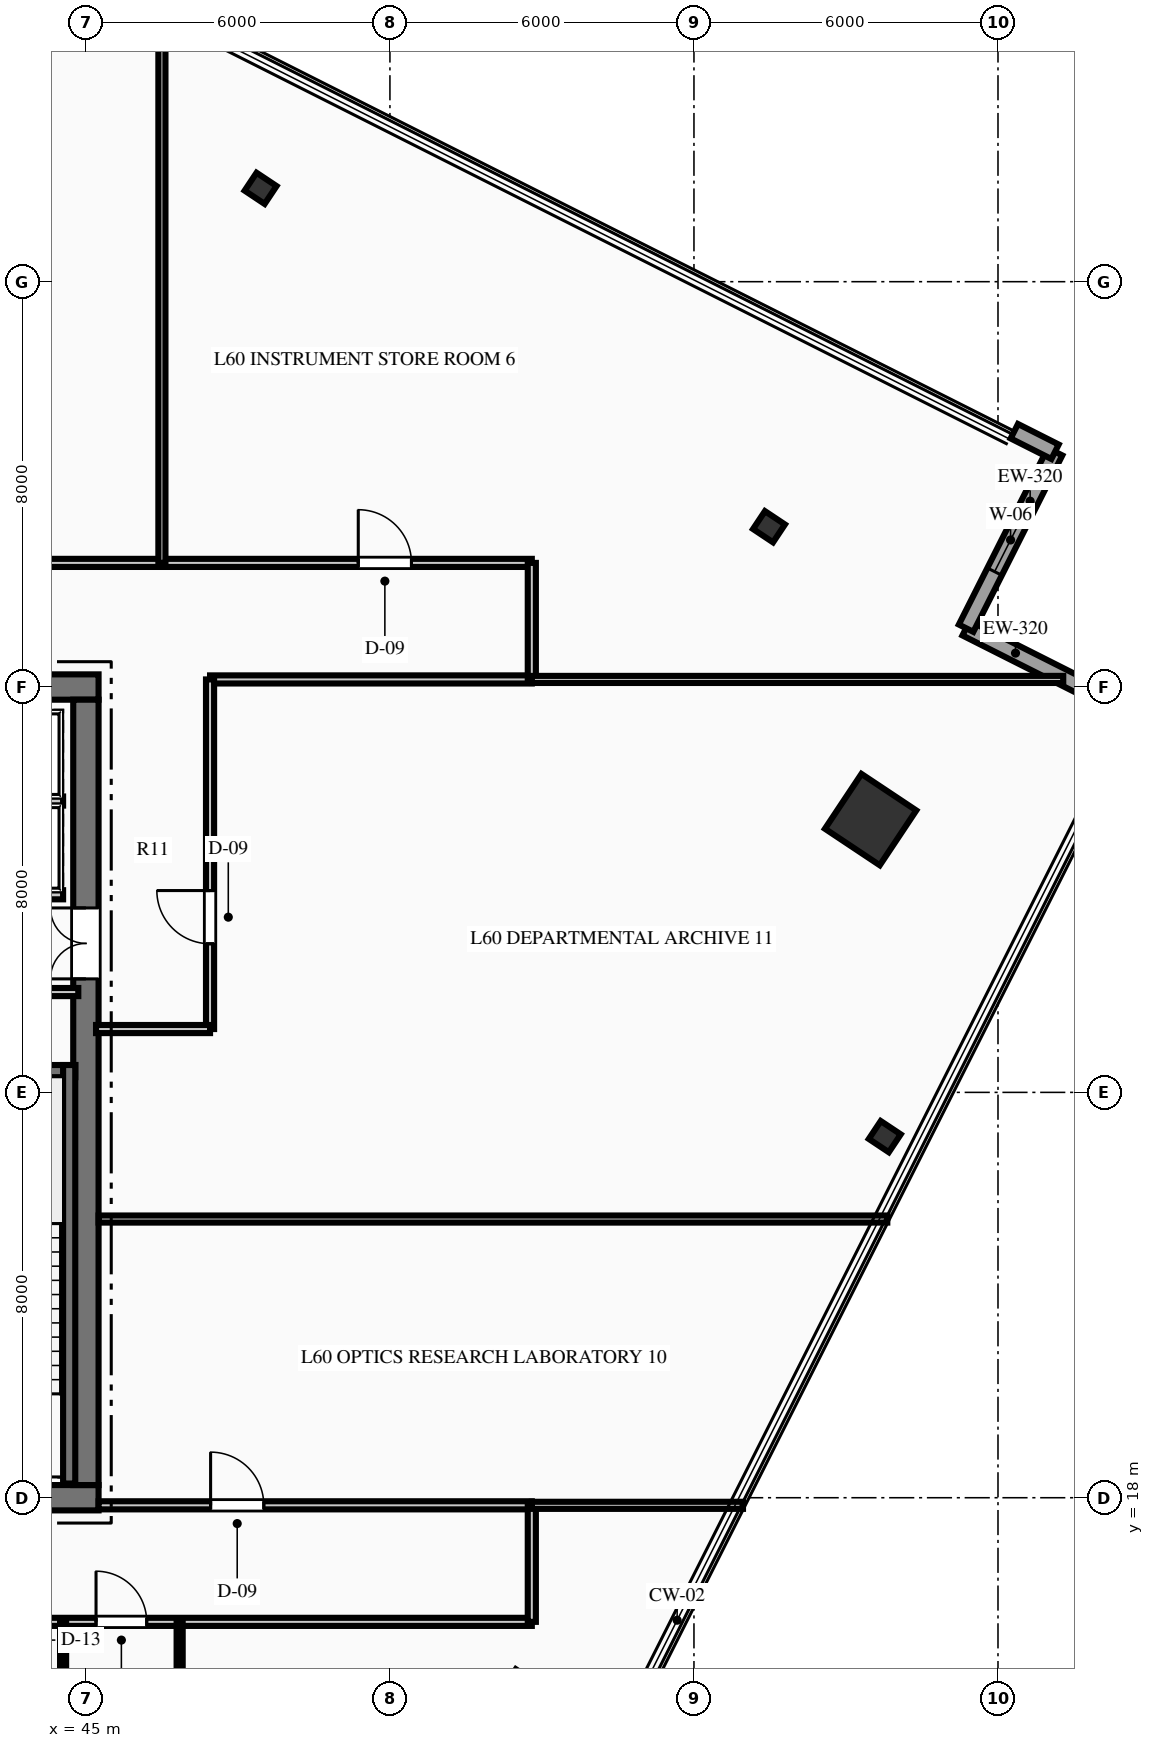
"""IFC4 building model, lengths in metres.
Left out: names, types, materials, properties, quantities, classifications, styles, units other than length and angle.
Written with IfcOpenShell. Run it as: python <this file> out.ifc"""

import sys

from ifc_helpers import new_model, si_unit, direction, frame, frame_2d, origin, origin_2d, place, context, subcontext, project, spatial, rectangle, hollow_rectangle, i_section, extrude, element, fill, save


model = new_model("IFC4")
c1 = context("Model", 3, precision=1e-05, world=origin(), true_north=direction((0.0, 1.0)))
c2 = subcontext(c1, "Body", "Model", "MODEL_VIEW")
j1 = project(units=[si_unit("LENGTHUNIT", "METRE"), si_unit("PLANEANGLEUNIT", "RADIAN")], contexts=[c1])
p1 = place(None, origin())
s1 = spatial("IfcSite", under=j1, at=p1, CompositionType="ELEMENT")
p2 = place(p1, origin())
s2 = spatial("IfcBuilding", under=s1, at=p2, CompositionType="ELEMENT")
p3 = place(p2, frame((0.0, 0.0, 239.7)))
s3 = spatial("IfcBuildingStorey", under=s2, at=p3, CompositionType="ELEMENT", Elevation=239.7)
p4 = place(p3, frame((26.75, 18.0, 0.0), z_axis=(0.0, 0.0, 1.0), x_axis=(1.0, 0.0, 0.0)))
e1 = element("IfcWall", 1, at=p4, inside=s3, PredefinedType="SHEAR", context=c2, shape_type="SweptSolid", body=[
    extrude(rectangle(XDim=18.5, YDim=0.5, at=frame_2d((9.25, 0.0))), origin(), (0.0, 0.0, 1.0), 4.5),
])
p5 = place(p4, frame((7.35, 0.0, 0.0)))
e2 = element("IfcOpeningElement", 2, at=p5, cuts=e1, PredefinedType="OPENING", context=c2, shape_type="SweptSolid", body=[
    extrude(rectangle(XDim=1.1, YDim=2.15, at=frame_2d((0.55, 1.075))), frame((0.0, 0.26, 0.0), z_axis=(0.0, -1.0, 0.0), x_axis=(1.0, 0.0, 0.0)), (0.0, 0.0, 1.0), 0.52),
])
p6 = place(p4, frame((10.05, 0.0, 0.0)))
e3 = element("IfcOpeningElement", 3, at=p6, cuts=e1, PredefinedType="OPENING", context=c2, shape_type="SweptSolid", body=[
    extrude(rectangle(XDim=1.1, YDim=2.15, at=frame_2d((0.55, 1.075))), frame((0.0, 0.26, 0.0), z_axis=(0.0, -1.0, 0.0), x_axis=(1.0, 0.0, 0.0)), (0.0, 0.0, 1.0), 0.52),
])
p7 = place(p3, frame((26.75, 34.0, 0.0), z_axis=(0.0, 0.0, 1.0), x_axis=(1.0, 0.0, 0.0)))
e4 = element("IfcWall", 4, at=p7, inside=s3, PredefinedType="SHEAR", context=c2, shape_type="SweptSolid", body=[
    extrude(rectangle(XDim=18.5, YDim=0.5, at=frame_2d((9.25, 0.0))), origin(), (0.0, 0.0, 1.0), 4.5),
])
p8 = place(p7, frame((13.935, 0.0, 0.0)))
e5 = element("IfcOpeningElement", 5, at=p8, cuts=e4, PredefinedType="OPENING", context=c2, shape_type="SweptSolid", body=[
    extrude(rectangle(XDim=1.1, YDim=2.15, at=frame_2d((0.55, 1.075))), frame((0.0, 0.26, 0.0), z_axis=(0.0, -1.0, 0.0), x_axis=(1.0, 0.0, 0.0)), (0.0, 0.0, 1.0), 0.52),
])
p9 = place(p7, frame((16.185, 0.0, 0.0)))
e6 = element("IfcOpeningElement", 6, at=p9, cuts=e4, PredefinedType="OPENING", context=c2, shape_type="SweptSolid", body=[
    extrude(rectangle(XDim=1.1, YDim=2.15, at=frame_2d((0.55, 1.075))), frame((0.0, 0.26, 0.0), z_axis=(0.0, -1.0, 0.0), x_axis=(1.0, 0.0, 0.0)), (0.0, 0.0, 1.0), 0.52),
])
p10 = place(p3, frame((45.0, 18.25, 0.0), z_axis=(0.0, 0.0, 1.0), x_axis=(0.0, 1.0, 0.0)))
e7 = element("IfcWall", 7, at=p10, inside=s3, PredefinedType="SHEAR", context=c2, shape_type="SweptSolid", body=[
    extrude(rectangle(XDim=15.5, YDim=0.5, at=frame_2d((7.75, 0.0))), origin(), (0.0, 0.0, 1.0), 4.5),
])
p11 = place(p10, frame((9.99, 0.0, 0.0)))
e8 = element("IfcOpeningElement", 8, at=p11, cuts=e7, PredefinedType="OPENING", context=c2, shape_type="SweptSolid", body=[
    extrude(rectangle(XDim=1.4, YDim=2.2, at=frame_2d((0.7, 1.1))), frame((0.0, 0.26, 0.0), z_axis=(0.0, -1.0, 0.0), x_axis=(1.0, 0.0, 0.0)), (0.0, 0.0, 1.0), 0.52),
])
p12 = place(p3, frame((40.81, 26.42, 0.0), z_axis=(0.0, 0.0, 1.0), x_axis=(1.0, 0.0, 0.0)))
e9 = element("IfcWall", 9, at=p12, inside=s3, PredefinedType="SHEAR", context=c2, shape_type="SweptSolid", body=[
    extrude(rectangle(XDim=3.98, YDim=0.24, at=frame_2d((1.99, 0.0))), origin(), (0.0, 0.0, 1.0), 4.5),
])
p13 = place(p3, frame((44.67, 18.28, 0.0), z_axis=(0.0, 0.0, 1.0), x_axis=(0.0, 1.0, 0.0)))
e10 = element("IfcWall", 10, at=p13, inside=s3, PredefinedType="SHEAR", context=c2, shape_type="SweptSolid", body=[
    extrude(rectangle(XDim=8.26, YDim=0.24, at=frame_2d((4.13, 0.0))), origin(), (0.0, 0.0, 1.0), 4.5),
])
p14 = place(p3, frame((60.486, 31.384, 0.0), z_axis=(0.0, 0.0, 1.0), x_axis=(0.554118199338, 0.832437998389, 0.0)))
e11 = element("IfcColumn", 11, at=p14, inside=s3, PredefinedType="COLUMN", context=c2, shape_type="SweptSolid", body=[
    extrude(hollow_rectangle(XDim=1.3, YDim=1.3, WallThickness=0.06, at=origin_2d()), origin(), (0.0, 0.0, 1.0), 4.5),
])
for number, where, z_axis, x_axis in (
    (12, (60.766, 25.126, 0.0), (0.0, 0.0, 1.0), (0.554, 0.832, 0.0)),
    (13, (58.481, 37.164, 0.0), (0.0, 0.0, 1.0), (0.554, 0.832, 0.0)),
    (14, (48.448, 43.842, 0.0), (0.0, 0.0, 1.0), (0.554, 0.832, 0.0)),
):
    element("IfcColumn", number, at=place(p3, frame(where, z_axis=z_axis, x_axis=x_axis)), inside=s3, PredefinedType="COLUMN", context=c2, shape_type="SweptSolid", body=[
        extrude(i_section(OverallWidth=0.424, OverallDepth=0.474, WebThickness=0.048, FlangeThickness=0.077, at=origin_2d()), origin(), (0.0, 0.0, 1.0), 4.5),
    ])
p15 = place(p3, frame((62.371, 35.161, 0.0), z_axis=(0.0, 0.0, 1.0), x_axis=(0.892982765682, -0.450090857711, 0.0)))
e15 = element("IfcWall", 15, at=p15, inside=s3, PredefinedType="STANDARD", context=c2, shape_type="SweptSolid", body=[
    extrude(rectangle(XDim=3.9, YDim=0.32, at=frame_2d((1.95, 0.0))), origin(), (0.0, 0.0, 1.0), 4.1),
])
p16 = place(p3, frame((64.126, 38.644, 0.0), z_axis=(0.0, 0.0, 1.0), x_axis=(-0.450090857711, -0.892982765682, 0.0)))
e16 = element("IfcWall", 16, at=p16, inside=s3, PredefinedType="STANDARD", context=c2, shape_type="SweptSolid", body=[
    extrude(rectangle(XDim=3.9, YDim=0.32, at=frame_2d((1.95, 0.0))), origin(), (0.0, 0.0, 1.0), 4.1),
])
p17 = place(p16, frame((1.25, 0.0, 0.85)))
e17 = element("IfcOpeningElement", 17, at=p17, cuts=e16, PredefinedType="OPENING", context=c2, shape_type="SweptSolid", body=[
    extrude(rectangle(XDim=1.4, YDim=2.0, at=frame_2d((0.7, 1.0))), frame((0.0, 0.17, 0.0), z_axis=(0.0, -1.0, 0.0), x_axis=(1.0, 0.0, 0.0)), (0.0, 0.0, 1.0), 0.34),
])
p18 = place(p3, frame((63.322, 39.049, 0.0), z_axis=(0.0, 0.0, 1.0), x_axis=(0.893012151464, -0.450032551421, 0.0)))
e18 = element("IfcWall", 18, at=p18, inside=s3, PredefinedType="STANDARD", context=c2, shape_type="SweptSolid", body=[
    extrude(rectangle(XDim=0.9, YDim=0.32, at=frame_2d((0.45, 0.0))), origin(), (0.0, 0.0, 1.0), 4.1),
])
p19 = place(p3, frame((40.8, 27.98, 0.0), z_axis=(0.0, 0.0, 1.0), x_axis=(1.0, 0.0, 0.0)))
e19 = element("IfcWall", 19, at=p19, inside=s3, PredefinedType="PARTITIONING", context=c2, shape_type="SweptSolid", body=[
    extrude(rectangle(XDim=4.05, YDim=0.16, at=frame_2d((2.025, 0.0))), origin(), (0.0, 0.0, 1.0), 4.1),
])
p20 = place(p19, frame((0.407, 0.0, 0.0)))
e20 = element("IfcOpeningElement", 20, at=p20, cuts=e19, PredefinedType="OPENING", context=c2, shape_type="SweptSolid", body=[
    extrude(rectangle(XDim=0.9, YDim=2.15, at=frame_2d((0.45, 1.075))), frame((0.0, 0.09, 0.0), z_axis=(0.0, -1.0, 0.0), x_axis=(1.0, 0.0, 0.0)), (0.0, 0.0, 1.0), 0.18),
])
p21 = place(p19, frame((2.2, 0.0, 0.0)))
e21 = element("IfcOpeningElement", 21, at=p21, cuts=e19, PredefinedType="OPENING", context=c2, shape_type="SweptSolid", body=[
    extrude(rectangle(XDim=0.9, YDim=2.15, at=frame_2d((0.45, 1.075))), frame((0.0, 0.09, 0.0), z_axis=(0.0, -1.0, 0.0), x_axis=(1.0, 0.0, 0.0)), (0.0, 0.0, 1.0), 0.18),
])
p22 = place(p3, frame((40.12, 29.9, 0.0), z_axis=(0.0, 0.0, 1.0), x_axis=(1.0, 0.0, 0.0)))
e22 = element("IfcWall", 22, at=p22, inside=s3, PredefinedType="PARTITIONING", context=c2, shape_type="SweptSolid", body=[
    extrude(rectangle(XDim=4.43, YDim=0.18, at=frame_2d((2.215, 0.0))), origin(), (0.0, 0.0, 1.0), 4.1),
])
p23 = place(p22, frame((0.565, 0.0, 0.0)))
e23 = element("IfcOpeningElement", 23, at=p23, cuts=e22, PredefinedType="OPENING", context=c2, shape_type="SweptSolid", body=[
    extrude(rectangle(XDim=1.1, YDim=2.15, at=frame_2d((0.55, 1.075))), frame((0.0, 0.1, 0.0), z_axis=(0.0, -1.0, 0.0), x_axis=(1.0, 0.0, 0.0)), (0.0, 0.0, 1.0), 0.2),
])
p24 = place(p22, frame((2.815, 0.0, 0.0)))
e24 = element("IfcOpeningElement", 24, at=p24, cuts=e22, PredefinedType="OPENING", context=c2, shape_type="SweptSolid", body=[
    extrude(rectangle(XDim=1.1, YDim=2.15, at=frame_2d((0.55, 1.075))), frame((0.0, 0.1, 0.0), z_axis=(0.0, -1.0, 0.0), x_axis=(1.0, 0.0, 0.0)), (0.0, 0.0, 1.0), 0.2),
])
p25 = place(p3, frame((40.12, 31.75, 0.0), z_axis=(0.0, 0.0, 1.0), x_axis=(1.0, 0.0, 0.0)))
e25 = element("IfcWall", 25, at=p25, inside=s3, PredefinedType="PARTITIONING", context=c2, shape_type="SweptSolid", body=[
    extrude(rectangle(XDim=4.43, YDim=0.18, at=frame_2d((2.215, 0.0))), origin(), (0.0, 0.0, 1.0), 4.1),
])
p26 = place(p3, frame((18.2, 15.55, 0.0), z_axis=(0.0, 0.0, 1.0), x_axis=(1.0, 0.0, 0.0)))
e26 = element("IfcWall", 26, at=p26, inside=s3, PredefinedType="PARTITIONING", context=c2, shape_type="SweptSolid", body=[
    extrude(rectangle(XDim=35.6, YDim=0.16, at=frame_2d((17.8, 0.0))), origin(), (0.0, 0.0, 1.0), 2.595),
])
p27 = place(p26, frame((22.45, 0.0, 0.0)))
e27 = element("IfcOpeningElement", 27, at=p27, cuts=e26, PredefinedType="OPENING", context=c2, shape_type="SweptSolid", body=[
    extrude(rectangle(XDim=0.9, YDim=2.15, at=frame_2d((0.45, 1.075))), frame((0.0, 0.09, 0.0), z_axis=(0.0, -1.0, 0.0), x_axis=(1.0, 0.0, 0.0)), (0.0, 0.0, 1.0), 0.18),
])
p28 = place(p26, frame((24.75, 0.0, 0.0)))
e28 = element("IfcOpeningElement", 28, at=p28, cuts=e26, PredefinedType="OPENING", context=c2, shape_type="SweptSolid", body=[
    extrude(rectangle(XDim=0.9, YDim=2.15, at=frame_2d((0.45, 1.075))), frame((0.0, 0.09, 0.0), z_axis=(0.0, -1.0, 0.0), x_axis=(1.0, 0.0, 0.0)), (0.0, 0.0, 1.0), 0.18),
])
p29 = place(p26, frame((27.0, 0.0, 0.0)))
e29 = element("IfcOpeningElement", 29, at=p29, cuts=e26, PredefinedType="OPENING", context=c2, shape_type="SweptSolid", body=[
    extrude(rectangle(XDim=1.0, YDim=2.15, at=frame_2d((0.5, 1.075))), frame((0.0, 0.09, 0.0), z_axis=(0.0, -1.0, 0.0), x_axis=(1.0, 0.0, 0.0)), (0.0, 0.0, 1.0), 0.18),
])
p30 = place(p26, frame((4.207, 0.0, 0.0)))
e30 = element("IfcOpeningElement", 30, at=p30, cuts=e26, PredefinedType="OPENING", context=c2, shape_type="SweptSolid", body=[
    extrude(rectangle(XDim=1.05, YDim=2.15, at=frame_2d((0.525, 1.075))), frame((0.0, 0.09, 0.0), z_axis=(0.0, -1.0, 0.0), x_axis=(1.0, 0.0, 0.0)), (0.0, 0.0, 1.0), 0.18),
])
p31 = place(p26, frame((16.707, 0.0, 0.0)))
e31 = element("IfcOpeningElement", 31, at=p31, cuts=e26, PredefinedType="OPENING", context=c2, shape_type="SweptSolid", body=[
    extrude(rectangle(XDim=1.05, YDim=2.15, at=frame_2d((0.525, 1.075))), frame((0.0, 0.09, 0.0), z_axis=(0.0, -1.0, 0.0), x_axis=(1.0, 0.0, 0.0)), (0.0, 0.0, 1.0), 0.18),
])
p32 = place(p3, frame((45.25, 17.85, 0.0), z_axis=(0.0, 0.0, 1.0), x_axis=(1.0, 0.0, 0.0)))
e32 = element("IfcWall", 32, at=p32, inside=s3, PredefinedType="PARTITIONING", context=c2, shape_type="SweptSolid", body=[
    extrude(rectangle(XDim=8.55, YDim=0.16, at=frame_2d((4.275, 0.0))), origin(), (0.0, 0.0, 1.0), 4.1),
])
p33 = place(p32, frame((2.211, 0.0, 0.0)))
e33 = element("IfcOpeningElement", 33, at=p33, cuts=e32, PredefinedType="OPENING", context=c2, shape_type="SweptSolid", body=[
    extrude(rectangle(XDim=1.05, YDim=2.15, at=frame_2d((0.525, 1.075))), frame((0.0, 0.09, 0.0), z_axis=(0.0, -1.0, 0.0), x_axis=(1.0, 0.0, 0.0)), (0.0, 0.0, 1.0), 0.18),
])
p34 = place(p3, frame((18.2, 36.45, 0.0), z_axis=(0.0, 0.0, 1.0), x_axis=(1.0, 0.0, 0.0)))
e34 = element("IfcWall", 34, at=p34, inside=s3, PredefinedType="PARTITIONING", context=c2, shape_type="SweptSolid", body=[
    extrude(rectangle(XDim=35.6, YDim=0.16, at=frame_2d((17.8, 0.0))), origin(), (0.0, 0.0, 1.0), 2.595),
])
p35 = place(p34, frame((2.965, 0.0, 0.0)))
e35 = element("IfcOpeningElement", 35, at=p35, cuts=e34, PredefinedType="OPENING", context=c2, shape_type="SweptSolid", body=[
    extrude(rectangle(XDim=1.05, YDim=2.15, at=frame_2d((0.525, 1.075))), frame((0.0, 0.09, 0.0), z_axis=(0.0, -1.0, 0.0), x_axis=(1.0, 0.0, 0.0)), (0.0, 0.0, 1.0), 0.18),
])
p36 = place(p34, frame((10.855, 0.0, 0.0)))
e36 = element("IfcOpeningElement", 36, at=p36, cuts=e34, PredefinedType="OPENING", context=c2, shape_type="SweptSolid", body=[
    extrude(rectangle(XDim=1.05, YDim=2.15, at=frame_2d((0.525, 1.075))), frame((0.0, 0.09, 0.0), z_axis=(0.0, -1.0, 0.0), x_axis=(1.0, 0.0, 0.0)), (0.0, 0.0, 1.0), 0.18),
])
p37 = place(p34, frame((18.135, 0.0, 0.0)))
e37 = element("IfcOpeningElement", 37, at=p37, cuts=e34, PredefinedType="OPENING", context=c2, shape_type="SweptSolid", body=[
    extrude(rectangle(XDim=1.05, YDim=2.15, at=frame_2d((0.525, 1.075))), frame((0.0, 0.09, 0.0), z_axis=(0.0, -1.0, 0.0), x_axis=(1.0, 0.0, 0.0)), (0.0, 0.0, 1.0), 0.18),
])
p38 = place(p34, frame((32.175, 0.0, 0.0)))
e38 = element("IfcOpeningElement", 38, at=p38, cuts=e34, PredefinedType="OPENING", context=c2, shape_type="SweptSolid", body=[
    extrude(rectangle(XDim=1.05, YDim=2.15, at=frame_2d((0.525, 1.075))), frame((0.0, 0.09, 0.0), z_axis=(0.0, -1.0, 0.0), x_axis=(1.0, 0.0, 0.0)), (0.0, 0.0, 1.0), 0.18),
])
p39 = place(p3, frame((47.45, 34.15, 0.0), z_axis=(0.0, 0.0, 1.0), x_axis=(1.0, 0.0, 0.0)))
e39 = element("IfcWall", 39, at=p39, inside=s3, PredefinedType="PARTITIONING", context=c2, shape_type="SweptSolid", body=[
    extrude(rectangle(XDim=6.35, YDim=0.16, at=frame_2d((3.175, 0.0))), origin(), (0.0, 0.0, 1.0), 2.595),
])
p40 = place(p3, frame((47.45, 27.25, 0.0), z_axis=(0.0, 0.0, 1.0), x_axis=(0.0, 1.0, 0.0)))
e40 = element("IfcWall", 40, at=p40, inside=s3, PredefinedType="PARTITIONING", context=c2, shape_type="SweptSolid", body=[
    extrude(rectangle(XDim=6.9, YDim=0.16, at=frame_2d((3.45, 0.0))), origin(), (0.0, 0.0, 1.0), 4.1),
])
p41 = place(p40, frame((1.683, 0.0, 0.0)))
e41 = element("IfcOpeningElement", 41, at=p41, cuts=e40, PredefinedType="OPENING", context=c2, shape_type="SweptSolid", body=[
    extrude(rectangle(XDim=1.05, YDim=2.15, at=frame_2d((0.525, 1.075))), frame((0.0, 0.09, 0.0), z_axis=(0.0, -1.0, 0.0), x_axis=(1.0, 0.0, 0.0)), (0.0, 0.0, 1.0), 0.18),
])
p42 = place(p3, frame((45.2, 27.25, 0.0), z_axis=(0.0, 0.0, 1.0), x_axis=(1.0, 0.0, 0.0)))
e42 = element("IfcWall", 42, at=p42, inside=s3, PredefinedType="PARTITIONING", context=c2, shape_type="SweptSolid", body=[
    extrude(rectangle(XDim=2.25, YDim=0.16, at=frame_2d((1.125, 0.0))), origin(), (0.0, 0.0, 1.0), 4.1),
])
for number, where, z_axis, x_axis in (
    (43, (53.8, 15.55, 0.0), (0.0, 0.0, 1.0), (0.0, 1.0, 0.0)),
    (44, (53.8, 34.15, 0.0), (0.0, 0.0, 1.0), (0.0, 1.0, 0.0)),
):
    element("IfcWall", number, at=place(p3, frame(where, z_axis=z_axis, x_axis=x_axis)), inside=s3, PredefinedType="PARTITIONING", context=c2, shape_type="SweptSolid", body=[
        extrude(rectangle(XDim=2.3, YDim=0.16, at=frame_2d((1.15, 0.0))), origin(), (0.0, 0.0, 1.0), 4.1),
    ])
for number, where, z_axis, x_axis in (
    (45, (44.55, 11.65, 0.0), (0.0, 0.0, 1.0), (0.0, 1.0, 0.0)),
    (46, (46.85, 11.65, 0.0), (0.0, 0.0, 1.0), (0.0, 1.0, 0.0)),
):
    element("IfcWall", number, at=place(p3, frame(where, z_axis=z_axis, x_axis=x_axis)), inside=s3, PredefinedType="PARTITIONING", context=c2, shape_type="SweptSolid", body=[
        extrude(rectangle(XDim=3.9, YDim=0.12, at=frame_2d((1.95, 0.0))), origin(), (0.0, 0.0, 1.0), 4.1),
    ])
p43 = place(p3, frame((53.8, 17.85, 0.0), z_axis=(0.0, 0.0, 1.0), x_axis=(1.0, 0.0, 0.0)))
e47 = element("IfcWall", 47, at=p43, inside=s3, PredefinedType="PARTITIONING", context=c2, shape_type="SweptSolid", body=[
    extrude(rectangle(XDim=4.168, YDim=0.14, at=frame_2d((2.084, 0.0))), origin(), (0.0, 0.0, 1.0), 4.1),
])
p44 = place(p3, frame((53.8, 34.15, 0.0), z_axis=(0.0, 0.0, 1.0), x_axis=(1.0, 0.0, 0.0)))
e48 = element("IfcWall", 48, at=p44, inside=s3, PredefinedType="PARTITIONING", context=c2, shape_type="SweptSolid", body=[
    extrude(rectangle(XDim=10.488, YDim=0.14, at=frame_2d((5.244, 0.0))), origin(), (0.0, 0.0, 1.0), 4.1),
])
p45 = place(p3, frame((46.5, 36.45, 0.0), z_axis=(0.0, 0.0, 1.0), x_axis=(0.0, 1.0, 0.0)))
e49 = element("IfcWall", 49, at=p45, inside=s3, PredefinedType="PARTITIONING", context=c2, shape_type="SweptSolid", body=[
    extrude(rectangle(XDim=11.033, YDim=0.14, at=frame_2d((5.517, 0.0))), origin(), (0.0, 0.0, 1.0), 4.1),
])
p46 = place(p3, frame((45.25, 23.5, 0.0), z_axis=(0.0, 0.0, 1.0), x_axis=(1.0, 0.0, 0.0)))
e50 = element("IfcWall", 50, at=p46, inside=s3, PredefinedType="PARTITIONING", context=c2, shape_type="SweptSolid", body=[
    extrude(rectangle(XDim=15.565, YDim=0.14, at=frame_2d((7.783, 0.0))), origin(), (0.0, 0.0, 1.0), 4.1),
])
p47 = place(p17, origin())
e51 = element("IfcWindow", 51, at=p47, inside=s3, PartitioningType="SINGLE_PANEL", PredefinedType="WINDOW", context=c2, shape_type="SweptSolid", body=[
    extrude(rectangle(XDim=1.4, YDim=2.0, at=frame_2d((0.7, 1.0))), frame((0.0, 0.03, 0.0), z_axis=(0.0, -1.0, 0.0), x_axis=(1.0, 0.0, 0.0)), (0.0, 0.0, 1.0), 0.06),
])
fill(e17, e51)
p48 = place(p11, origin())
e52 = element("IfcDoor", 52, at=p48, inside=s3, OperationType="DOUBLE_DOOR_SINGLE_SWING", PredefinedType="DOOR", context=c2, shape_type="SweptSolid", body=[
    extrude(rectangle(XDim=1.4, YDim=2.2, at=frame_2d((0.7, 1.1))), frame((0.0, 0.025, 0.0), z_axis=(0.0, -1.0, 0.0), x_axis=(1.0, 0.0, 0.0)), (0.0, 0.0, 1.0), 0.05),
])
fill(e8, e52)
p49 = place(p29, origin())
e53 = element("IfcDoor", 53, at=p49, inside=s3, OperationType="SINGLE_SWING_LEFT", PredefinedType="DOOR", context=c2, shape_type="SweptSolid", body=[
    extrude(rectangle(XDim=1.0, YDim=2.15, at=frame_2d((0.5, 1.075))), frame((0.0, 0.025, 0.0), z_axis=(0.0, -1.0, 0.0), x_axis=(1.0, 0.0, 0.0)), (0.0, 0.0, 1.0), 0.05),
])
fill(e29, e53)
p50 = place(p38, origin())
e54 = element("IfcDoor", 54, at=p50, inside=s3, OperationType="SINGLE_SWING_LEFT", PredefinedType="DOOR", context=c2, shape_type="SweptSolid", body=[
    extrude(rectangle(XDim=1.05, YDim=2.15, at=frame_2d((0.525, 1.075))), frame((0.0, 0.025, 0.0), z_axis=(0.0, -1.0, 0.0), x_axis=(1.0, 0.0, 0.0)), (0.0, 0.0, 1.0), 0.05),
])
fill(e38, e54)
p51 = place(p33, origin())
e55 = element("IfcDoor", 55, at=p51, inside=s3, OperationType="SINGLE_SWING_LEFT", PredefinedType="DOOR", context=c2, shape_type="SweptSolid", body=[
    extrude(rectangle(XDim=1.05, YDim=2.15, at=frame_2d((0.525, 1.075))), frame((0.0, 0.025, 0.0), z_axis=(0.0, -1.0, 0.0), x_axis=(1.0, 0.0, 0.0)), (0.0, 0.0, 1.0), 0.05),
])
fill(e33, e55)
p52 = place(p41, origin())
e56 = element("IfcDoor", 56, at=p52, inside=s3, OperationType="SINGLE_SWING_RIGHT", PredefinedType="DOOR", context=c2, shape_type="SweptSolid", body=[
    extrude(rectangle(XDim=1.05, YDim=2.15, at=frame_2d((0.525, 1.075))), frame((0.0, 0.025, 0.0), z_axis=(0.0, -1.0, 0.0), x_axis=(1.0, 0.0, 0.0)), (0.0, 0.0, 1.0), 0.05),
])
fill(e41, e56)
save(model, sys.argv[1])
